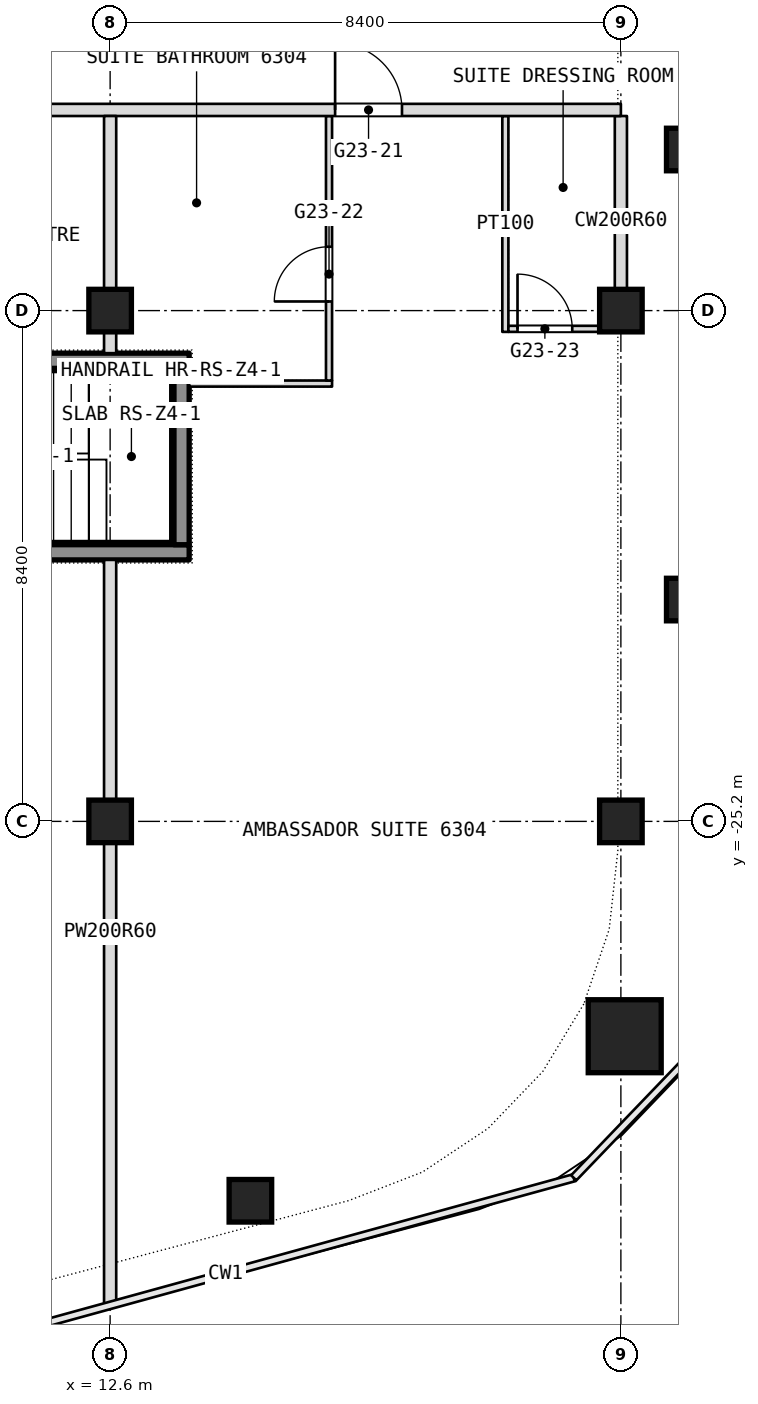
"""IFC4 building model, lengths in metres.
Left out: names, types, materials, properties, quantities, classifications, styles, units other than length and angle.
Written with IfcOpenShell. Run it as: python <this file> out.ifc"""

import sys

from ifc_helpers import new_model, si_unit, direction, frame, frame_2d, origin, origin_2d, place, context, subcontext, project, spatial, rectangle, extrude, element, fill, save


model = new_model("IFC4")
c1 = context("Model", 3, precision=1e-05, world=origin(), true_north=direction((0.0, 1.0)))
c2 = subcontext(c1, "Body", "Model", "MODEL_VIEW")
j1 = project(units=[si_unit("LENGTHUNIT", "METRE"), si_unit("PLANEANGLEUNIT", "RADIAN")], contexts=[c1])
p1 = place(None, origin())
s1 = spatial("IfcSite", under=j1, at=p1, CompositionType="ELEMENT")
p2 = place(p1, origin())
s2 = spatial("IfcBuilding", under=s1, at=p2, CompositionType="ELEMENT")
p3 = place(p2, frame((0.0, 0.0, 274.1)))
s3 = spatial("IfcBuildingStorey", under=s2, at=p3, CompositionType="ELEMENT", Elevation=274.1)
p4 = place(p3, frame((21.063, -28.733, 0.0), z_axis=(0.0, 0.0, 1.0), x_axis=(1.0, 0.0, 0.0)))
e1 = element("IfcColumn", 1, at=p4, inside=s3, PredefinedType="COLUMN", context=c2, shape_type="SweptSolid", body=[
    extrude(rectangle(XDim=1.2, YDim=1.2, at=origin_2d()), origin(), (0.0, 0.0, 1.0), 3.6),
])
for number, where, z_axis, x_axis in (
    (2, (12.6, -25.2, 0.0), (0.0, 0.0, 1.0), (1.0, 0.0, 0.0)),
    (3, (12.6, -16.8, 0.0), (0.0, 0.0, 1.0), (1.0, 0.0, 0.0)),
    (4, (21.0, -25.2, 0.0), (0.0, 0.0, 1.0), (1.0, 0.0, 0.0)),
    (5, (21.0, -16.8, 0.0), (0.0, 0.0, 1.0), (1.0, 0.0, 0.0)),
    (6, (22.1, -14.151, 0.0), (0.0, 0.0, 1.0), (1.0, 0.0, 0.0)),
    (7, (22.1, -21.552, 0.0), (0.0, 0.0, 1.0), (1.0, 0.0, 0.0)),
    (8, (14.907, -31.439, 0.0), (0.0, 0.0, 1.0), (1.0, 0.0, 0.0)),
):
    element("IfcColumn", number, at=place(p3, frame(where, z_axis=z_axis, x_axis=x_axis)), inside=s3, PredefinedType="COLUMN", context=c2, shape_type="SweptSolid", body=[
        extrude(rectangle(XDim=0.7, YDim=0.7, at=origin_2d()), origin(), (0.0, 0.0, 1.0), 3.6),
    ])
p5 = place(p3, frame((21.0, -17.05, 0.0), z_axis=(0.0, 0.0, 1.0), x_axis=(0.0, 1.0, 0.0)))
e9 = element("IfcWall", 9, at=p5, inside=s3, PredefinedType="PARTITIONING", context=c2, shape_type="SweptSolid", body=[
    extrude(rectangle(XDim=3.45, YDim=0.2, at=frame_2d((1.725, 0.0))), origin(), (0.0, 0.0, 1.0), 3.34),
])
p6 = place(p3, frame((19.1, -17.15, 0.0), z_axis=(0.0, 0.0, 1.0), x_axis=(0.0, 1.0, 0.0)))
e10 = element("IfcWall", 10, at=p6, inside=s3, PredefinedType="PARTITIONING", context=c2, shape_type="SweptSolid", body=[
    extrude(rectangle(XDim=3.55, YDim=0.1, at=frame_2d((1.775, 0.0))), origin(), (0.0, 0.0, 1.0), 3.34),
])
p7 = place(p3, frame((13.9, -18.0, 0.0), z_axis=(0.0, 0.0, 1.0), x_axis=(1.0, 0.0, 0.0)))
e11 = element("IfcWall", 11, at=p7, inside=s3, PredefinedType="PARTITIONING", context=c2, shape_type="SweptSolid", body=[
    extrude(rectangle(XDim=2.35, YDim=0.1, at=frame_2d((1.175, 0.0))), origin(), (0.0, 0.0, 1.0), 3.34),
])
p8 = place(p3, frame((19.15, -17.1, 0.0), z_axis=(0.0, 0.0, 1.0), x_axis=(1.0, 0.0, 0.0)))
e12 = element("IfcWall", 12, at=p8, inside=s3, PredefinedType="PARTITIONING", context=c2, shape_type="SweptSolid", body=[
    extrude(rectangle(XDim=1.85, YDim=0.1, at=frame_2d((0.925, 0.0))), origin(), (0.0, 0.0, 1.0), 3.34),
])
p9 = place(p8, frame((0.15, 0.0, 0.0)))
e13 = element("IfcOpeningElement", 13, at=p9, cuts=e12, PredefinedType="OPENING", context=c2, shape_type="SweptSolid", body=[
    extrude(rectangle(XDim=0.9, YDim=2.1, at=frame_2d((0.45, 1.05))), frame((0.0, 0.05, 0.0), z_axis=(0.0, -1.0, 0.0), x_axis=(1.0, 0.0, 0.0)), (0.0, 0.0, 1.0), 0.1),
])
p10 = place(p3, frame((16.2, -17.95, 0.0), z_axis=(0.0, 0.0, 1.0), x_axis=(0.0, 1.0, 0.0)))
e14 = element("IfcWall", 14, at=p10, inside=s3, PredefinedType="PARTITIONING", context=c2, shape_type="SweptSolid", body=[
    extrude(rectangle(XDim=4.35, YDim=0.1, at=frame_2d((2.175, 0.0))), origin(), (0.0, 0.0, 1.0), 3.34),
])
p11 = place(p10, frame((1.3, 0.0, 0.0)))
e15 = element("IfcOpeningElement", 15, at=p11, cuts=e14, PredefinedType="OPENING", context=c2, shape_type="SweptSolid", body=[
    extrude(rectangle(XDim=0.9, YDim=2.1, at=frame_2d((0.45, 1.05))), frame((0.0, 0.05, 0.0), z_axis=(0.0, -1.0, 0.0), x_axis=(1.0, 0.0, 0.0)), (0.0, 0.0, 1.0), 0.1),
])
p12 = place(p3, frame((7.6, -13.5, 0.0), z_axis=(0.0, 0.0, 1.0), x_axis=(1.0, 0.0, 0.0)))
e16 = element("IfcWall", 16, at=p12, inside=s3, PredefinedType="PARTITIONING", context=c2, shape_type="SweptSolid", body=[
    extrude(rectangle(XDim=13.4, YDim=0.2, at=frame_2d((6.7, 0.0))), origin(), (0.0, 0.0, 1.0), 3.34),
])
p13 = place(p12, frame((8.7, 0.0, 0.0)))
e17 = element("IfcOpeningElement", 17, at=p13, cuts=e16, PredefinedType="OPENING", context=c2, shape_type="SweptSolid", body=[
    extrude(rectangle(XDim=1.1, YDim=2.1, at=frame_2d((0.55, 1.05))), frame((0.0, 0.1, 0.0), z_axis=(0.0, -1.0, 0.0), x_axis=(1.0, 0.0, 0.0)), (0.0, 0.0, 1.0), 0.2),
])
p14 = place(p3, frame((12.6, -33.13, 0.0), z_axis=(0.0, 0.0, 1.0), x_axis=(0.0, 1.0, 0.0)))
e18 = element("IfcWall", 18, at=p14, inside=s3, PredefinedType="PARTITIONING", context=c2, shape_type="SweptSolid", body=[
    extrude(rectangle(XDim=12.23, YDim=0.2, at=frame_2d((6.115, 0.0))), origin(), (0.0, 0.0, 1.0), 3.34),
])
p15 = place(p3, frame((12.6, -17.5, 0.0), z_axis=(0.0, 0.0, 1.0), x_axis=(0.0, 1.0, 0.0)))
e19 = element("IfcWall", 19, at=p15, inside=s3, PredefinedType="PARTITIONING", context=c2, shape_type="SweptSolid", body=[
    extrude(rectangle(XDim=3.9, YDim=0.2, at=frame_2d((1.95, 0.0))), origin(), (0.0, 0.0, 1.0), 3.34),
])
for number, where, z_axis, x_axis in (
    (20, (7.7, -20.775, 0.1), (0.0, 0.0, 1.0), (1.0, 0.0, 0.0)),
    (21, (7.7, -17.625, 0.1), (0.0, 0.0, 1.0), (1.0, 0.0, 0.0)),
):
    element("IfcWall", number, at=place(p3, frame(where, z_axis=z_axis, x_axis=x_axis)), inside=s3, PredefinedType="SHEAR", context=c2, shape_type="SweptSolid", body=[
        extrude(rectangle(XDim=6.2, YDim=0.25, at=frame_2d((3.1, 0.0))), origin(), (0.0, 0.0, 1.0), 3.6),
    ])
p16 = place(p3, frame((13.775, -20.65, 0.1), z_axis=(0.0, 0.0, 1.0), x_axis=(0.0, 1.0, 0.0)))
e22 = element("IfcWall", 22, at=p16, inside=s3, PredefinedType="SHEAR", context=c2, shape_type="SweptSolid", body=[
    extrude(rectangle(XDim=2.9, YDim=0.25, at=frame_2d((1.45, 0.0))), origin(), (0.0, 0.0, 1.0), 3.6),
])
p17 = place(p9, origin())
e23 = element("IfcDoor", 23, at=p17, inside=s3, OperationType="SINGLE_SWING_LEFT", PredefinedType="DOOR", context=c2, shape_type="SweptSolid", body=[
    extrude(rectangle(XDim=0.9, YDim=2.1, at=frame_2d((0.45, 1.05))), frame((0.0, 0.025, 0.0), z_axis=(0.0, -1.0, 0.0), x_axis=(1.0, 0.0, 0.0)), (0.0, 0.0, 1.0), 0.05),
])
fill(e13, e23)
p18 = place(p11, origin())
e24 = element("IfcDoor", 24, at=p18, inside=s3, OperationType="SINGLE_SWING_LEFT", PredefinedType="DOOR", context=c2, shape_type="SweptSolid", body=[
    extrude(rectangle(XDim=0.9, YDim=2.1, at=frame_2d((0.45, 1.05))), frame((0.0, 0.025, 0.0), z_axis=(0.0, -1.0, 0.0), x_axis=(1.0, 0.0, 0.0)), (0.0, 0.0, 1.0), 0.05),
])
fill(e15, e24)
p19 = place(p13, origin())
e25 = element("IfcDoor", 25, at=p19, inside=s3, OperationType="SINGLE_SWING_RIGHT", PredefinedType="DOOR", context=c2, shape_type="SweptSolid", body=[
    extrude(rectangle(XDim=1.1, YDim=2.1, at=frame_2d((0.55, 1.05))), frame((0.0, 0.025, 0.0), z_axis=(0.0, -1.0, 0.0), x_axis=(1.0, 0.0, 0.0)), (0.0, 0.0, 1.0), 0.05),
])
fill(e17, e25)
save(model, sys.argv[1])
